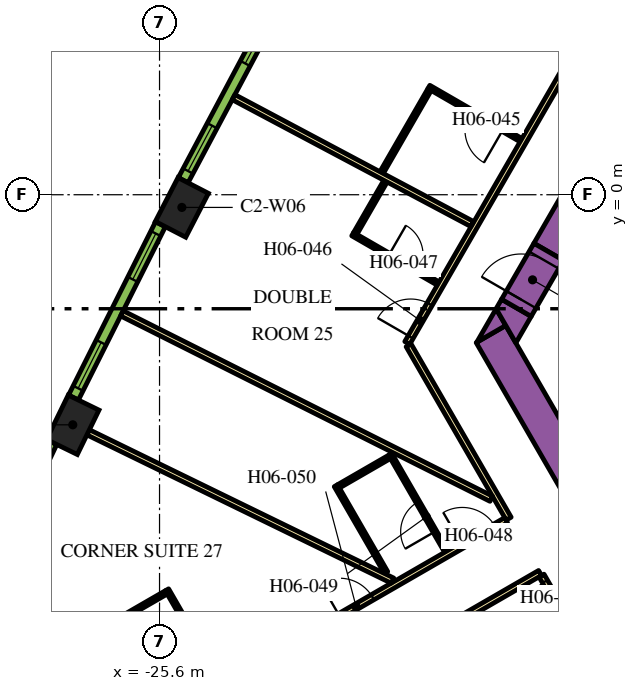
"""IFC4 building model, lengths in metres.
Left out: names, types, materials, properties, quantities, classifications, styles, units other than length and angle.
Written with IfcOpenShell. Run it as: python <this file> out.ifc"""

import sys

from ifc_helpers import new_model, si_unit, direction, frame, frame_2d, origin, origin_2d, place, context, subcontext, project, spatial, polyline, rectangle, outline, extrude, element, fill, save


model = new_model("IFC4")
c1 = context("Model", 3, precision=1e-05, world=origin(), true_north=direction((0.0, 1.0)))
c2 = subcontext(c1, "Body", "Model", "MODEL_VIEW")
j1 = project(units=[si_unit("LENGTHUNIT", "METRE"), si_unit("PLANEANGLEUNIT", "RADIAN")], contexts=[c1])
p1 = place(None, origin())
s1 = spatial("IfcSite", under=j1, at=p1, CompositionType="ELEMENT")
p2 = place(p1, origin())
s2 = spatial("IfcBuilding", under=s1, at=p2, CompositionType="ELEMENT")
p3 = place(p2, frame((0.0, 0.0, 83.7)))
s3 = spatial("IfcBuildingStorey", under=s2, at=p3, CompositionType="ELEMENT", Elevation=83.7)
for number, where, z_axis, x_axis in (
    (1, (-25.012, -0.334, 0.0), (0.0, 0.0, 1.0), (-0.459, -0.888, 0.0)),
    (2, (-27.883, -6.054, 0.0), (0.0, 0.0, 1.0), (-0.438, -0.899, 0.0)),
):
    element("IfcColumn", number, at=place(p3, frame(where, z_axis=z_axis, x_axis=x_axis)), inside=s3, PredefinedType="COLUMN", context=c2, shape_type="SweptSolid", body=[
        extrude(rectangle(XDim=1.3, YDim=0.9, at=origin_2d()), origin(), (0.0, 0.0, 1.0), 3.9),
    ])
p4 = place(p3, frame((-15.36, -1.503, 0.0), z_axis=(0.0, 0.0, 1.0), x_axis=(0.50000389221, 0.866023156604, 0.0)))
e3 = element("IfcWall", 3, at=p4, inside=s3, PredefinedType="SOLIDWALL", context=c2, shape_type="SweptSolid", body=[
    extrude(rectangle(XDim=21.0, YDim=0.9, at=frame_2d((10.5, 0.0))), origin(), (0.0, 0.0, 1.0), 3.9),
])
p5 = place(p3, frame((-12.134, -11.883, 0.0), z_axis=(0.0, 0.0, 1.0), x_axis=(-0.500005339912, 0.866022320763, 0.0)))
e4 = element("IfcWall", 4, at=p5, inside=s3, PredefinedType="SOLIDWALL", context=c2, shape_type="SweptSolid", body=[
    extrude(rectangle(XDim=9.488, YDim=0.9, at=frame_2d((4.744, 0.0))), origin(), (0.0, 0.0, 1.0), 3.9),
])
p6 = place(p3, origin())
e5 = element("IfcWall", 5, at=p6, inside=s3, PredefinedType="SOLIDWALL", context=c2, shape_type="SweptSolid", body=[
    extrude(outline(polyline([(-16.489, -3.44), (-17.251, -3.88), (-16.743, -3.0), (-16.489, -3.44)])), origin(), (0.0, 0.0, 1.0), 3.9),
])
e6 = element("IfcWall", 6, at=p6, inside=s3, PredefinedType="SOLIDWALL", context=c2, shape_type="SweptSolid", body=[
    extrude(outline(polyline([(-15.82, -3.201), (-16.223, -3.9), (-16.743, -3.0), (-16.599, -2.751), (-15.82, -3.201)])), origin(), (0.0, 0.0, 1.0), 3.9),
])
p7 = place(p3, frame((-16.209, -2.976, 0.0), z_axis=(0.0, 0.0, 1.0), x_axis=(0.499954529098, 0.86605165483, 0.0)))
e7 = element("IfcWall", 7, at=p7, inside=s3, PredefinedType="SOLIDWALL", context=c2, shape_type="SweptSolid", body=[
    extrude(rectangle(XDim=1.7, YDim=0.9, at=frame_2d((0.85, 0.0))), origin(), (0.0, 0.0, 1.0), 3.9),
])
p8 = place(p7, frame((0.25, 0.0, 0.0)))
e8 = element("IfcOpeningElement", 8, at=p8, cuts=e7, PredefinedType="OPENING", context=c2, shape_type="SweptSolid", body=[
    extrude(rectangle(XDim=1.2, YDim=2.1, at=frame_2d((0.6, 1.05))), frame((0.0, 0.46, 0.0), z_axis=(0.0, -1.0, 0.0), x_axis=(1.0, 0.0, 0.0)), (0.0, 0.0, 1.0), 0.92),
])
p9 = place(p3, frame((-19.081, -3.9, 0.0), z_axis=(0.0, 0.0, 1.0), x_axis=(0.499998313975, 0.866026377209, 0.0)))
e9 = element("IfcWall", 9, at=p9, inside=s3, PredefinedType="PARTITIONING", context=c2, shape_type="SweptSolid", body=[
    extrude(rectangle(XDim=25.766, YDim=0.15, at=frame_2d((12.883, 0.0))), origin(), (0.0, 0.0, 1.0), 2.75),
])
p10 = place(p9, frame((19.306, 0.0, 0.0)))
e10 = element("IfcOpeningElement", 10, at=p10, cuts=e9, PredefinedType="OPENING", context=c2, shape_type="SweptSolid", body=[
    extrude(rectangle(XDim=1.0, YDim=2.1, at=frame_2d((0.5, 1.05))), frame((0.0, 0.085, 0.0), z_axis=(0.0, -1.0, 0.0), x_axis=(1.0, 0.0, 0.0)), (0.0, 0.0, 1.0), 0.17),
])
p11 = place(p9, frame((18.0, 0.0, 0.0)))
e11 = element("IfcOpeningElement", 11, at=p11, cuts=e9, PredefinedType="OPENING", context=c2, shape_type="SweptSolid", body=[
    extrude(rectangle(XDim=1.0, YDim=2.1, at=frame_2d((0.5, 1.05))), frame((0.0, 0.085, 0.0), z_axis=(0.0, -1.0, 0.0), x_axis=(1.0, 0.0, 0.0)), (0.0, 0.0, 1.0), 0.17),
])
p12 = place(p9, frame((10.874, 0.0, 0.0)))
e12 = element("IfcOpeningElement", 12, at=p12, cuts=e9, PredefinedType="OPENING", context=c2, shape_type="SweptSolid", body=[
    extrude(rectangle(XDim=0.9, YDim=2.1, at=frame_2d((0.45, 1.05))), frame((0.0, 0.085, 0.0), z_axis=(0.0, -1.0, 0.0), x_axis=(1.0, 0.0, 0.0)), (0.0, 0.0, 1.0), 0.17),
])
p13 = place(p9, frame((8.548, 0.0, 0.0)))
e13 = element("IfcOpeningElement", 13, at=p13, cuts=e9, PredefinedType="OPENING", context=c2, shape_type="SweptSolid", body=[
    extrude(rectangle(XDim=1.1, YDim=2.1, at=frame_2d((0.55, 1.05))), frame((0.0, 0.085, 0.0), z_axis=(0.0, -1.0, 0.0), x_axis=(1.0, 0.0, 0.0)), (0.0, 0.0, 1.0), 0.17),
])
p14 = place(p9, frame((0.18, 0.0, 0.0)))
e14 = element("IfcOpeningElement", 14, at=p14, cuts=e9, PredefinedType="OPENING", context=c2, shape_type="SweptSolid", body=[
    extrude(rectangle(XDim=1.0, YDim=2.1, at=frame_2d((0.5, 1.05))), frame((0.0, 0.085, 0.0), z_axis=(0.0, -1.0, 0.0), x_axis=(1.0, 0.0, 0.0)), (0.0, 0.0, 1.0), 0.17),
])
p15 = place(p3, frame((-16.412, -8.523, 0.0), z_axis=(0.0, 0.0, 1.0), x_axis=(-0.500001929737, 0.866024289647, 0.0)))
e15 = element("IfcWall", 15, at=p15, inside=s3, PredefinedType="PARTITIONING", context=c2, shape_type="SweptSolid", body=[
    extrude(rectangle(XDim=5.268, YDim=0.15, at=frame_2d((2.634, 0.0))), origin(), (0.0, 0.0, 1.0), 2.75),
])
p16 = place(p3, frame((-28.211, -15.335, 0.0), z_axis=(0.0, 0.0, 1.0), x_axis=(0.866025884867, 0.49999916674, 0.0)))
e16 = element("IfcWall", 16, at=p16, inside=s3, PredefinedType="PARTITIONING", context=c2, shape_type="SweptSolid", body=[
    extrude(rectangle(XDim=13.543, YDim=0.15, at=frame_2d((6.772, 0.0))), origin(), (0.0, 0.0, 1.0), 2.75),
])
p17 = place(p16, frame((12.214, 0.0, 0.0)))
e17 = element("IfcOpeningElement", 17, at=p17, cuts=e16, PredefinedType="OPENING", context=c2, shape_type="SweptSolid", body=[
    extrude(rectangle(XDim=1.0, YDim=2.1, at=frame_2d((0.5, 1.05))), frame((0.0, 0.085, 0.0), z_axis=(0.0, -1.0, 0.0), x_axis=(1.0, 0.0, 0.0)), (0.0, 0.0, 1.0), 0.17),
])
p18 = place(p16, frame((8.488, 0.0, 0.0)))
e18 = element("IfcOpeningElement", 18, at=p18, cuts=e16, PredefinedType="OPENING", context=c2, shape_type="SweptSolid", body=[
    extrude(rectangle(XDim=1.0, YDim=2.1, at=frame_2d((0.5, 1.05))), frame((0.0, 0.085, 0.0), z_axis=(0.0, -1.0, 0.0), x_axis=(1.0, 0.0, 0.0)), (0.0, 0.0, 1.0), 0.17),
])
p19 = place(p3, frame((-15.587, -9.952, 0.0), z_axis=(0.0, 0.0, 1.0), x_axis=(-0.866017869832, -0.500013048961, 0.0)))
e19 = element("IfcWall", 19, at=p19, inside=s3, PredefinedType="PARTITIONING", context=c2, shape_type="SweptSolid", body=[
    extrude(rectangle(XDim=13.624, YDim=0.15, at=frame_2d((6.812, 0.0))), origin(), (0.0, 0.0, 1.0), 2.75),
])
p20 = place(p19, frame((4.134, 0.0, 0.0)))
e20 = element("IfcOpeningElement", 20, at=p20, cuts=e19, PredefinedType="OPENING", context=c2, shape_type="SweptSolid", body=[
    extrude(rectangle(XDim=1.0, YDim=2.1, at=frame_2d((0.5, 1.05))), frame((0.0, 0.085, 0.0), z_axis=(0.0, -1.0, 0.0), x_axis=(1.0, 0.0, 0.0)), (0.0, 0.0, 1.0), 0.17),
])
p21 = place(p3, frame((-12.918, -14.575, 0.0), z_axis=(0.0, 0.0, 1.0), x_axis=(-0.500009150678, 0.866020120573, 0.0)))
e21 = element("IfcWall", 21, at=p21, inside=s3, PredefinedType="PARTITIONING", context=c2, shape_type="SweptSolid", body=[
    extrude(rectangle(XDim=5.258, YDim=0.15, at=frame_2d((2.629, 0.0))), origin(), (0.0, 0.0, 1.0), 2.75),
])
p22 = place(p21, frame((4.078, 0.0, 0.0)))
e22 = element("IfcOpeningElement", 22, at=p22, cuts=e21, PredefinedType="OPENING", context=c2, shape_type="SweptSolid", body=[
    extrude(rectangle(XDim=1.0, YDim=2.1, at=frame_2d((0.5, 1.05))), frame((0.0, 0.085, 0.0), z_axis=(0.0, -1.0, 0.0), x_axis=(1.0, 0.0, 0.0)), (0.0, 0.0, 1.0), 0.17),
])
p23 = place(p3, frame((-27.479, -6.251, 0.0), z_axis=(0.0, 0.0, 1.0), x_axis=(0.898945877276, -0.438059710231, 0.0)))
e23 = element("IfcWall", 23, at=p23, inside=s3, PredefinedType="PARTITIONING", context=c2, shape_type="SweptSolid", body=[
    extrude(rectangle(XDim=8.909, YDim=0.15, at=frame_2d((4.455, 0.0))), origin(), (0.0, 0.0, 1.0), 2.75),
])
p24 = place(p3, frame((-23.652, 2.567, 0.0), z_axis=(0.0, 0.0, 1.0), x_axis=(0.883019237957, -0.469336793144, 0.0)))
e24 = element("IfcWall", 24, at=p24, inside=s3, PredefinedType="PARTITIONING", context=c2, shape_type="SweptSolid", body=[
    extrude(rectangle(XDim=7.111, YDim=0.15, at=frame_2d((3.555, 0.0))), origin(), (0.0, 0.0, 1.0), 2.75),
])
p25 = place(p3, frame((-26.591, -3.122, 0.0), z_axis=(0.0, 0.0, 1.0), x_axis=(0.893766213273, -0.448533115847, 0.0)))
e25 = element("IfcWall", 25, at=p25, inside=s3, PredefinedType="PARTITIONING", context=c2, shape_type="SweptSolid", body=[
    extrude(rectangle(XDim=10.875, YDim=0.15, at=frame_2d((5.438, 0.0))), origin(), (0.0, 0.0, 1.0), 2.75),
])
p26 = place(p3, frame((-16.087, 1.436, 0.0), z_axis=(0.0, 0.0, 1.0), x_axis=(-0.866034573852, 0.49998411664, 0.0)))
e26 = element("IfcWall", 26, at=p26, inside=s3, PredefinedType="PARTITIONING", context=c2, shape_type="SweptSolid", body=[
    extrude(rectangle(XDim=2.8, YDim=0.1, at=frame_2d((1.4, 0.0))), origin(), (0.0, 0.0, 1.0), 2.75),
])
p27 = place(p26, frame((0.55, 0.0, 0.0)))
e27 = element("IfcOpeningElement", 27, at=p27, cuts=e26, PredefinedType="OPENING", context=c2, shape_type="SweptSolid", body=[
    extrude(rectangle(XDim=1.0, YDim=2.1, at=frame_2d((0.5, 1.05))), frame((0.0, 0.06, 0.0), z_axis=(0.0, -1.0, 0.0), x_axis=(1.0, 0.0, 0.0)), (0.0, 0.0, 1.0), 0.12),
])
p28 = place(p3, frame((-18.494, 2.768, 0.0), z_axis=(0.0, 0.0, 1.0), x_axis=(-0.500004791531, -0.866022637375, 0.0)))
e28 = element("IfcWall", 28, at=p28, inside=s3, PredefinedType="PARTITIONING", context=c2, shape_type="SweptSolid", body=[
    extrude(rectangle(XDim=2.52, YDim=0.1, at=frame_2d((1.26, 0.0))), origin(), (0.0, 0.0, 1.0), 2.75),
])
p29 = place(p3, frame((-20.518, -1.037, 0.0), z_axis=(0.0, 0.0, 1.0), x_axis=(0.866021400173, -0.500006934395, 0.0)))
e29 = element("IfcWall", 29, at=p29, inside=s3, PredefinedType="PARTITIONING", context=c2, shape_type="SweptSolid", body=[
    extrude(rectangle(XDim=2.6, YDim=0.1, at=frame_2d((1.3, 0.0))), origin(), (0.0, 0.0, 1.0), 2.75),
])
p30 = place(p29, frame((1.1, 0.0, 0.0)))
e30 = element("IfcOpeningElement", 30, at=p30, cuts=e29, PredefinedType="OPENING", context=c2, shape_type="SweptSolid", body=[
    extrude(rectangle(XDim=0.9, YDim=2.1, at=frame_2d((0.45, 1.05))), frame((0.0, 0.06, 0.0), z_axis=(0.0, -1.0, 0.0), x_axis=(1.0, 0.0, 0.0)), (0.0, 0.0, 1.0), 0.12),
])
p31 = place(p3, frame((-20.449, -1.019, 0.0), z_axis=(0.0, 0.0, 1.0), x_axis=(0.500061319399, 0.865989998118, 0.0)))
e31 = element("IfcWall", 31, at=p31, inside=s3, PredefinedType="PARTITIONING", context=c2, shape_type="SweptSolid", body=[
    extrude(rectangle(XDim=1.58, YDim=0.1, at=frame_2d((0.79, 0.0))), origin(), (0.0, 0.0, 1.0), 2.75),
])
p32 = place(p3, frame((-18.055, -9.385, 0.0), z_axis=(0.0, 0.0, 1.0), x_axis=(-0.499939757307, 0.866060182126, 0.0)))
e32 = element("IfcWall", 32, at=p32, inside=s3, PredefinedType="PARTITIONING", context=c2, shape_type="SweptSolid", body=[
    extrude(rectangle(XDim=2.95, YDim=0.1, at=frame_2d((1.475, 0.0))), origin(), (0.0, 0.0, 1.0), 2.75),
])
p33 = place(p32, frame((0.6, 0.0, 0.0)))
e33 = element("IfcOpeningElement", 33, at=p33, cuts=e32, PredefinedType="OPENING", context=c2, shape_type="SweptSolid", body=[
    extrude(rectangle(XDim=0.9, YDim=2.1, at=frame_2d((0.45, 1.05))), frame((0.0, 0.06, 0.0), z_axis=(0.0, -1.0, 0.0), x_axis=(1.0, 0.0, 0.0)), (0.0, 0.0, 1.0), 0.12),
])
p34 = place(p3, frame((-19.549, -6.898, 0.0), z_axis=(0.0, 0.0, 1.0), x_axis=(-0.866043940782, -0.499967891604, 0.0)))
e34 = element("IfcWall", 34, at=p34, inside=s3, PredefinedType="PARTITIONING", context=c2, shape_type="SweptSolid", body=[
    extrude(rectangle(XDim=1.55, YDim=0.1, at=frame_2d((0.775, 0.0))), origin(), (0.0, 0.0, 1.0), 2.75),
])
p35 = place(p3, frame((-19.639, -9.941, 0.0), z_axis=(0.0, 0.0, 1.0), x_axis=(-0.499938597367, 0.866060851709, 0.0)))
e35 = element("IfcWall", 35, at=p35, inside=s3, PredefinedType="PARTITIONING", context=c2, shape_type="SweptSolid", body=[
    extrude(rectangle(XDim=2.64, YDim=0.1, at=frame_2d((1.32, 0.0))), origin(), (0.0, 0.0, 1.0), 2.75),
])
p36 = place(p3, frame((-24.004, -12.82, 0.0), z_axis=(0.0, 0.0, 1.0), x_axis=(-0.500011755427, 0.866018616679, 0.0)))
e36 = element("IfcWall", 36, at=p36, inside=s3, PredefinedType="PARTITIONING", context=c2, shape_type="SweptSolid", body=[
    extrude(rectangle(XDim=2.8, YDim=0.1, at=frame_2d((1.4, 0.0))), origin(), (0.0, 0.0, 1.0), 2.75),
])
p37 = place(p36, frame((0.6, 0.0, 0.0)))
e37 = element("IfcOpeningElement", 37, at=p37, cuts=e36, PredefinedType="OPENING", context=c2, shape_type="SweptSolid", body=[
    extrude(rectangle(XDim=0.9, YDim=2.1, at=frame_2d((0.45, 1.05))), frame((0.0, 0.06, 0.0), z_axis=(0.0, -1.0, 0.0), x_axis=(1.0, 0.0, 0.0)), (0.0, 0.0, 1.0), 0.12),
])
p38 = place(p3, frame((-25.422, -10.463, 0.0), z_axis=(0.0, 0.0, 1.0), x_axis=(-0.866024647952, -0.500001309137, 0.0)))
e38 = element("IfcWall", 38, at=p38, inside=s3, PredefinedType="PARTITIONING", context=c2, shape_type="SweptSolid", body=[
    extrude(rectangle(XDim=2.4, YDim=0.1, at=frame_2d((1.2, 0.0))), origin(), (0.0, 0.0, 1.0), 2.75),
])
p39 = place(p3, frame((-22.583, 4.887, 0.0), z_axis=(0.0, 0.0, 1.0), x_axis=(-0.469323203119, -0.883026461106, 0.0)))
e39 = element("IfcWall", 39, at=p39, inside=s3, PredefinedType="SOLIDWALL", context=c2, shape_type="SweptSolid", body=[
    extrude(rectangle(XDim=5.101, YDim=0.29, at=frame_2d((2.55, 0.0))), origin(), (0.0, 0.0, 1.0), 3.65),
])
p40 = place(p39, frame((0.273, 0.0, 0.9)))
e40 = element("IfcOpeningElement", 40, at=p40, cuts=e39, PredefinedType="OPENING", context=c2, shape_type="SweptSolid", body=[
    extrude(rectangle(XDim=1.35, YDim=2.15, at=frame_2d((0.675, 1.075))), frame((0.0, 0.155, 0.0), z_axis=(0.0, -1.0, 0.0), x_axis=(1.0, 0.0, 0.0)), (0.0, 0.0, 1.0), 0.31),
])
p41 = place(p39, frame((3.478, 0.0, 0.9)))
e41 = element("IfcOpeningElement", 41, at=p41, cuts=e39, PredefinedType="OPENING", context=c2, shape_type="SweptSolid", body=[
    extrude(rectangle(XDim=1.35, YDim=2.15, at=frame_2d((0.675, 1.075))), frame((0.0, 0.155, 0.0), z_axis=(0.0, -1.0, 0.0), x_axis=(1.0, 0.0, 0.0)), (0.0, 0.0, 1.0), 0.31),
])
p42 = place(p3, frame((-25.576, -0.778, 0.0), z_axis=(0.0, 0.0, 1.0), x_axis=(-0.448534297211, -0.893765620409, 0.0)))
e42 = element("IfcWall", 42, at=p42, inside=s3, PredefinedType="SOLIDWALL", context=c2, shape_type="SweptSolid", body=[
    extrude(rectangle(XDim=5.1, YDim=0.29, at=frame_2d((2.55, 0.0))), origin(), (0.0, 0.0, 1.0), 3.65),
])
p43 = place(p42, frame((0.272, 0.0, 0.9)))
e43 = element("IfcOpeningElement", 43, at=p43, cuts=e42, PredefinedType="OPENING", context=c2, shape_type="SweptSolid", body=[
    extrude(rectangle(XDim=1.35, YDim=2.15, at=frame_2d((0.675, 1.075))), frame((0.0, 0.155, 0.0), z_axis=(0.0, -1.0, 0.0), x_axis=(1.0, 0.0, 0.0)), (0.0, 0.0, 1.0), 0.31),
])
p44 = place(p42, frame((3.478, 0.0, 0.9)))
e44 = element("IfcOpeningElement", 44, at=p44, cuts=e42, PredefinedType="OPENING", context=c2, shape_type="SweptSolid", body=[
    extrude(rectangle(XDim=1.35, YDim=2.15, at=frame_2d((0.675, 1.075))), frame((0.0, 0.155, 0.0), z_axis=(0.0, -1.0, 0.0), x_axis=(1.0, 0.0, 0.0)), (0.0, 0.0, 1.0), 0.31),
])
p45 = place(p3, frame((-28.436, -6.511, 0.0), z_axis=(0.0, 0.0, 1.0), x_axis=(-0.427543726596, -0.903994669148, 0.0)))
e45 = element("IfcWall", 45, at=p45, inside=s3, PredefinedType="SOLIDWALL", context=c2, shape_type="SweptSolid", body=[
    extrude(rectangle(XDim=5.107, YDim=0.29, at=frame_2d((2.553, 0.0))), origin(), (0.0, 0.0, 1.0), 3.65),
])
p46 = place(p45, frame((0.285, 0.0, 0.9)))
e46 = element("IfcOpeningElement", 46, at=p46, cuts=e45, PredefinedType="OPENING", context=c2, shape_type="SweptSolid", body=[
    extrude(rectangle(XDim=1.35, YDim=2.15, at=frame_2d((0.675, 1.075))), frame((0.0, 0.155, 0.0), z_axis=(0.0, -1.0, 0.0), x_axis=(1.0, 0.0, 0.0)), (0.0, 0.0, 1.0), 0.31),
])
p47 = place(p45, frame((3.516, 0.0, 0.9)))
e47 = element("IfcOpeningElement", 47, at=p47, cuts=e45, PredefinedType="OPENING", context=c2, shape_type="SweptSolid", body=[
    extrude(rectangle(XDim=1.35, YDim=2.15, at=frame_2d((0.675, 1.075))), frame((0.0, 0.155, 0.0), z_axis=(0.0, -1.0, 0.0), x_axis=(1.0, 0.0, 0.0)), (0.0, 0.0, 1.0), 0.31),
])
p48 = place(p8, origin())
e48 = element("IfcDoor", 48, at=p48, inside=s3, OperationType="SINGLE_SWING_LEFT", PredefinedType="DOOR", context=c2, shape_type="SweptSolid", body=[
    extrude(rectangle(XDim=1.2, YDim=2.1, at=frame_2d((0.6, 1.05))), frame((0.0, 0.025, 0.0), z_axis=(0.0, -1.0, 0.0), x_axis=(1.0, 0.0, 0.0)), (0.0, 0.0, 1.0), 0.05),
])
fill(e8, e48)
p49 = place(p22, origin())
e49 = element("IfcDoor", 49, at=p49, inside=s3, OperationType="SINGLE_SWING_RIGHT", PredefinedType="DOOR", context=c2, shape_type="SweptSolid", body=[
    extrude(rectangle(XDim=1.0, YDim=2.1, at=frame_2d((0.5, 1.05))), frame((0.0, 0.025, 0.0), z_axis=(0.0, -1.0, 0.0), x_axis=(1.0, 0.0, 0.0)), (0.0, 0.0, 1.0), 0.05),
])
fill(e22, e49)
p50 = place(p27, origin())
e50 = element("IfcDoor", 50, at=p50, inside=s3, OperationType="SINGLE_SWING_RIGHT", PredefinedType="DOOR", context=c2, shape_type="SweptSolid", body=[
    extrude(rectangle(XDim=1.0, YDim=2.1, at=frame_2d((0.5, 1.05))), frame((0.0, 0.025, 0.0), z_axis=(0.0, -1.0, 0.0), x_axis=(1.0, 0.0, 0.0)), (0.0, 0.0, 1.0), 0.05),
])
fill(e27, e50)
p51 = place(p14, origin())
e51 = element("IfcDoor", 51, at=p51, inside=s3, OperationType="SINGLE_SWING_LEFT", PredefinedType="DOOR", context=c2, shape_type="SweptSolid", body=[
    extrude(rectangle(XDim=1.0, YDim=2.1, at=frame_2d((0.5, 1.05))), frame((0.0, 0.025, 0.0), z_axis=(0.0, -1.0, 0.0), x_axis=(1.0, 0.0, 0.0)), (0.0, 0.0, 1.0), 0.05),
])
fill(e14, e51)
p52 = place(p30, origin())
e52 = element("IfcDoor", 52, at=p52, inside=s3, OperationType="SINGLE_SWING_LEFT", PredefinedType="DOOR", context=c2, shape_type="SweptSolid", body=[
    extrude(rectangle(XDim=0.9, YDim=2.1, at=frame_2d((0.45, 1.05))), frame((0.0, 0.025, 0.0), z_axis=(0.0, -1.0, 0.0), x_axis=(1.0, 0.0, 0.0)), (0.0, 0.0, 1.0), 0.05),
])
fill(e30, e52)
p53 = place(p17, origin())
e53 = element("IfcDoor", 53, at=p53, inside=s3, OperationType="SINGLE_SWING_RIGHT", PredefinedType="DOOR", context=c2, shape_type="SweptSolid", body=[
    extrude(rectangle(XDim=1.0, YDim=2.1, at=frame_2d((0.5, 1.05))), frame((0.0, 0.025, 0.0), z_axis=(0.0, -1.0, 0.0), x_axis=(1.0, 0.0, 0.0)), (0.0, 0.0, 1.0), 0.05),
])
fill(e17, e53)
p54 = place(p33, origin())
e54 = element("IfcDoor", 54, at=p54, inside=s3, OperationType="SINGLE_SWING_LEFT", PredefinedType="DOOR", context=c2, shape_type="SweptSolid", body=[
    extrude(rectangle(XDim=0.9, YDim=2.1, at=frame_2d((0.45, 1.05))), frame((0.0, 0.025, 0.0), z_axis=(0.0, -1.0, 0.0), x_axis=(1.0, 0.0, 0.0)), (0.0, 0.0, 1.0), 0.05),
])
fill(e33, e54)
p55 = place(p18, origin())
e55 = element("IfcDoor", 55, at=p55, inside=s3, OperationType="SINGLE_SWING_RIGHT", PredefinedType="DOOR", context=c2, shape_type="SweptSolid", body=[
    extrude(rectangle(XDim=1.0, YDim=2.1, at=frame_2d((0.5, 1.05))), frame((0.0, 0.025, 0.0), z_axis=(0.0, -1.0, 0.0), x_axis=(1.0, 0.0, 0.0)), (0.0, 0.0, 1.0), 0.05),
])
fill(e18, e55)
p56 = place(p40, origin())
e56 = element("IfcWindow", 56, at=p56, inside=s3, PartitioningType="DOUBLE_PANEL_VERTICAL", PredefinedType="WINDOW", context=c2, shape_type="SweptSolid", body=[
    extrude(rectangle(XDim=1.35, YDim=2.15, at=frame_2d((0.675, 1.075))), frame((0.0, 0.015, 0.0), z_axis=(0.0, -1.0, 0.0), x_axis=(1.0, 0.0, 0.0)), (0.0, 0.0, 1.0), 0.06),
])
fill(e40, e56)
p57 = place(p41, origin())
e57 = element("IfcWindow", 57, at=p57, inside=s3, PartitioningType="DOUBLE_PANEL_VERTICAL", PredefinedType="WINDOW", context=c2, shape_type="SweptSolid", body=[
    extrude(rectangle(XDim=1.35, YDim=2.15, at=frame_2d((0.675, 1.075))), frame((0.0, 0.015, 0.0), z_axis=(0.0, -1.0, 0.0), x_axis=(1.0, 0.0, 0.0)), (0.0, 0.0, 1.0), 0.06),
])
fill(e41, e57)
p58 = place(p43, origin())
e58 = element("IfcWindow", 58, at=p58, inside=s3, PartitioningType="DOUBLE_PANEL_VERTICAL", PredefinedType="WINDOW", context=c2, shape_type="SweptSolid", body=[
    extrude(rectangle(XDim=1.35, YDim=2.15, at=frame_2d((0.675, 1.075))), frame((0.0, 0.015, 0.0), z_axis=(0.0, -1.0, 0.0), x_axis=(1.0, 0.0, 0.0)), (0.0, 0.0, 1.0), 0.06),
])
fill(e43, e58)
p59 = place(p44, origin())
e59 = element("IfcWindow", 59, at=p59, inside=s3, PartitioningType="DOUBLE_PANEL_VERTICAL", PredefinedType="WINDOW", context=c2, shape_type="SweptSolid", body=[
    extrude(rectangle(XDim=1.35, YDim=2.15, at=frame_2d((0.675, 1.075))), frame((0.0, 0.015, 0.0), z_axis=(0.0, -1.0, 0.0), x_axis=(1.0, 0.0, 0.0)), (0.0, 0.0, 1.0), 0.06),
])
fill(e44, e59)
save(model, sys.argv[1])
